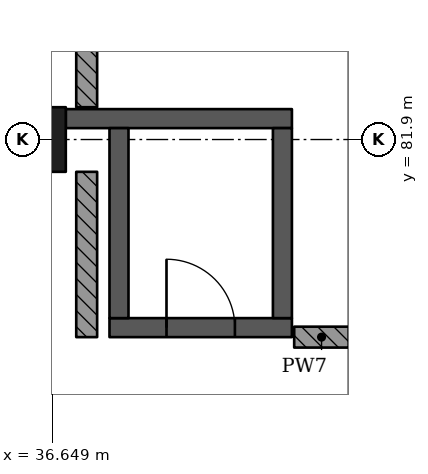
"""IFC4 building model, lengths in metres.
Left out: names, types, materials, properties, quantities, classifications, styles, units other than length and angle.
Written with IfcOpenShell. Run it as: python <this file> out.ifc"""

import sys

from ifc_helpers import new_model, si_unit, direction, frame, frame_2d, origin, origin_2d, place, context, subcontext, project, spatial, rectangle, extrude, element, fill, save


model = new_model("IFC4")
c1 = context("Model", 3, precision=1e-05, world=origin(), true_north=direction((0.0, 1.0)))
c2 = subcontext(c1, "Body", "Model", "MODEL_VIEW")
j1 = project(units=[si_unit("LENGTHUNIT", "METRE"), si_unit("PLANEANGLEUNIT", "RADIAN")], contexts=[c1])
p1 = place(None, origin())
s1 = spatial("IfcSite", under=j1, at=p1, CompositionType="ELEMENT")
p2 = place(p1, origin())
s2 = spatial("IfcBuilding", under=s1, at=p2, CompositionType="ELEMENT")
p3 = place(p2, origin())
s3 = spatial("IfcBuildingStorey", under=s2, at=p3, CompositionType="ELEMENT", Elevation=0.0)
p4 = place(p3, frame((36.4, 81.9, -0.4), z_axis=(0.0, 0.0, 1.0), x_axis=(1.0, 0.0, 0.0)))
e1 = element("IfcColumn", 1, at=p4, inside=s3, PredefinedType="COLUMN", context=c2, shape_type="SweptSolid", body=[
    extrude(rectangle(XDim=0.85, YDim=0.85, at=origin_2d()), origin(), (0.0, 0.0, 1.0), 6.77),
])
p5 = place(p3, frame((39.8, 79.425, -0.4), z_axis=(0.0, 0.0, 1.0), x_axis=(-1.0, 0.0, 0.0)))
e2 = element("IfcWall", 2, at=p5, inside=s3, PredefinedType="SHEAR", context=c2, shape_type="SweptSolid", body=[
    extrude(rectangle(XDim=2.4, YDim=0.25, at=frame_2d((1.2, 0.0))), origin(), (0.0, 0.0, 1.0), 6.77),
])
p6 = place(p5, frame((0.75, 0.0, 0.4)))
e3 = element("IfcOpeningElement", 3, at=p6, cuts=e2, PredefinedType="OPENING", context=c2, shape_type="SweptSolid", body=[
    extrude(rectangle(XDim=0.9, YDim=2.1, at=frame_2d((0.45, 1.05))), frame((0.0, 0.135, 0.0), z_axis=(0.0, -1.0, 0.0), x_axis=(1.0, 0.0, 0.0)), (0.0, 0.0, 1.0), 0.27),
])
p7 = place(p3, frame((39.8, 82.175, -0.4), z_axis=(0.0, 0.0, 1.0), x_axis=(-1.0, 0.0, 0.0)))
e4 = element("IfcWall", 4, at=p7, inside=s3, PredefinedType="SHEAR", context=c2, shape_type="SweptSolid", body=[
    extrude(rectangle(XDim=2.975, YDim=0.25, at=frame_2d((1.488, 0.0))), origin(), (0.0, 0.0, 1.0), 6.77),
])
for number, where, z_axis, x_axis in (
    (5, (37.525, 82.05, -0.4), (0.0, 0.0, 1.0), (0.0, -1.0, 0.0)),
    (6, (39.675, 82.05, -0.4), (0.0, 0.0, 1.0), (0.0, -1.0, 0.0)),
):
    element("IfcWall", number, at=place(p3, frame(where, z_axis=z_axis, x_axis=x_axis)), inside=s3, PredefinedType="SHEAR", context=c2, shape_type="SweptSolid", body=[
        extrude(rectangle(XDim=2.5, YDim=0.25, at=frame_2d((1.25, 0.0))), origin(), (0.0, 0.0, 1.0), 6.77),
    ])
p8 = place(p3, frame((37.1, 81.475, 0.0), z_axis=(0.0, 0.0, 1.0), x_axis=(0.0, -1.0, 0.0)))
e7 = element("IfcWall", 7, at=p8, inside=s3, PredefinedType="SOLIDWALL", context=c2, shape_type="SweptSolid", body=[
    extrude(rectangle(XDim=2.175, YDim=0.275, at=frame_2d((1.087, 0.0))), origin(), (0.0, 0.0, 1.0), 6.02),
])
p9 = place(p3, frame((37.1, 89.262, 0.0), z_axis=(0.0, 0.0, 1.0), x_axis=(0.0, -1.0, 0.0)))
e8 = element("IfcWall", 8, at=p9, inside=s3, PredefinedType="SOLIDWALL", context=c2, shape_type="SweptSolid", body=[
    extrude(rectangle(XDim=6.938, YDim=0.275, at=frame_2d((3.469, 0.0))), origin(), (0.0, 0.0, 1.0), 6.02),
])
p10 = place(p3, frame((40.55, 79.3, 0.0), z_axis=(0.0, 0.0, 1.0), x_axis=(-1.0, 0.0, 0.0)))
e9 = element("IfcWall", 9, at=p10, inside=s3, PredefinedType="SOLIDWALL", context=c2, shape_type="SweptSolid", body=[
    extrude(rectangle(XDim=0.72, YDim=0.275, at=frame_2d((0.36, 0.0))), origin(), (0.0, 0.0, 1.0), 6.02),
])
p11 = place(p6, origin())
e10 = element("IfcDoor", 10, at=p11, inside=s3, OperationType="SINGLE_SWING_RIGHT", PredefinedType="DOOR", context=c2, shape_type="SweptSolid", body=[
    extrude(rectangle(XDim=0.9, YDim=2.1, at=frame_2d((0.45, 1.05))), frame((0.0, 0.025, 0.0), z_axis=(0.0, -1.0, 0.0), x_axis=(1.0, 0.0, 0.0)), (0.0, 0.0, 1.0), 0.05),
])
fill(e3, e10)
save(model, sys.argv[1])
